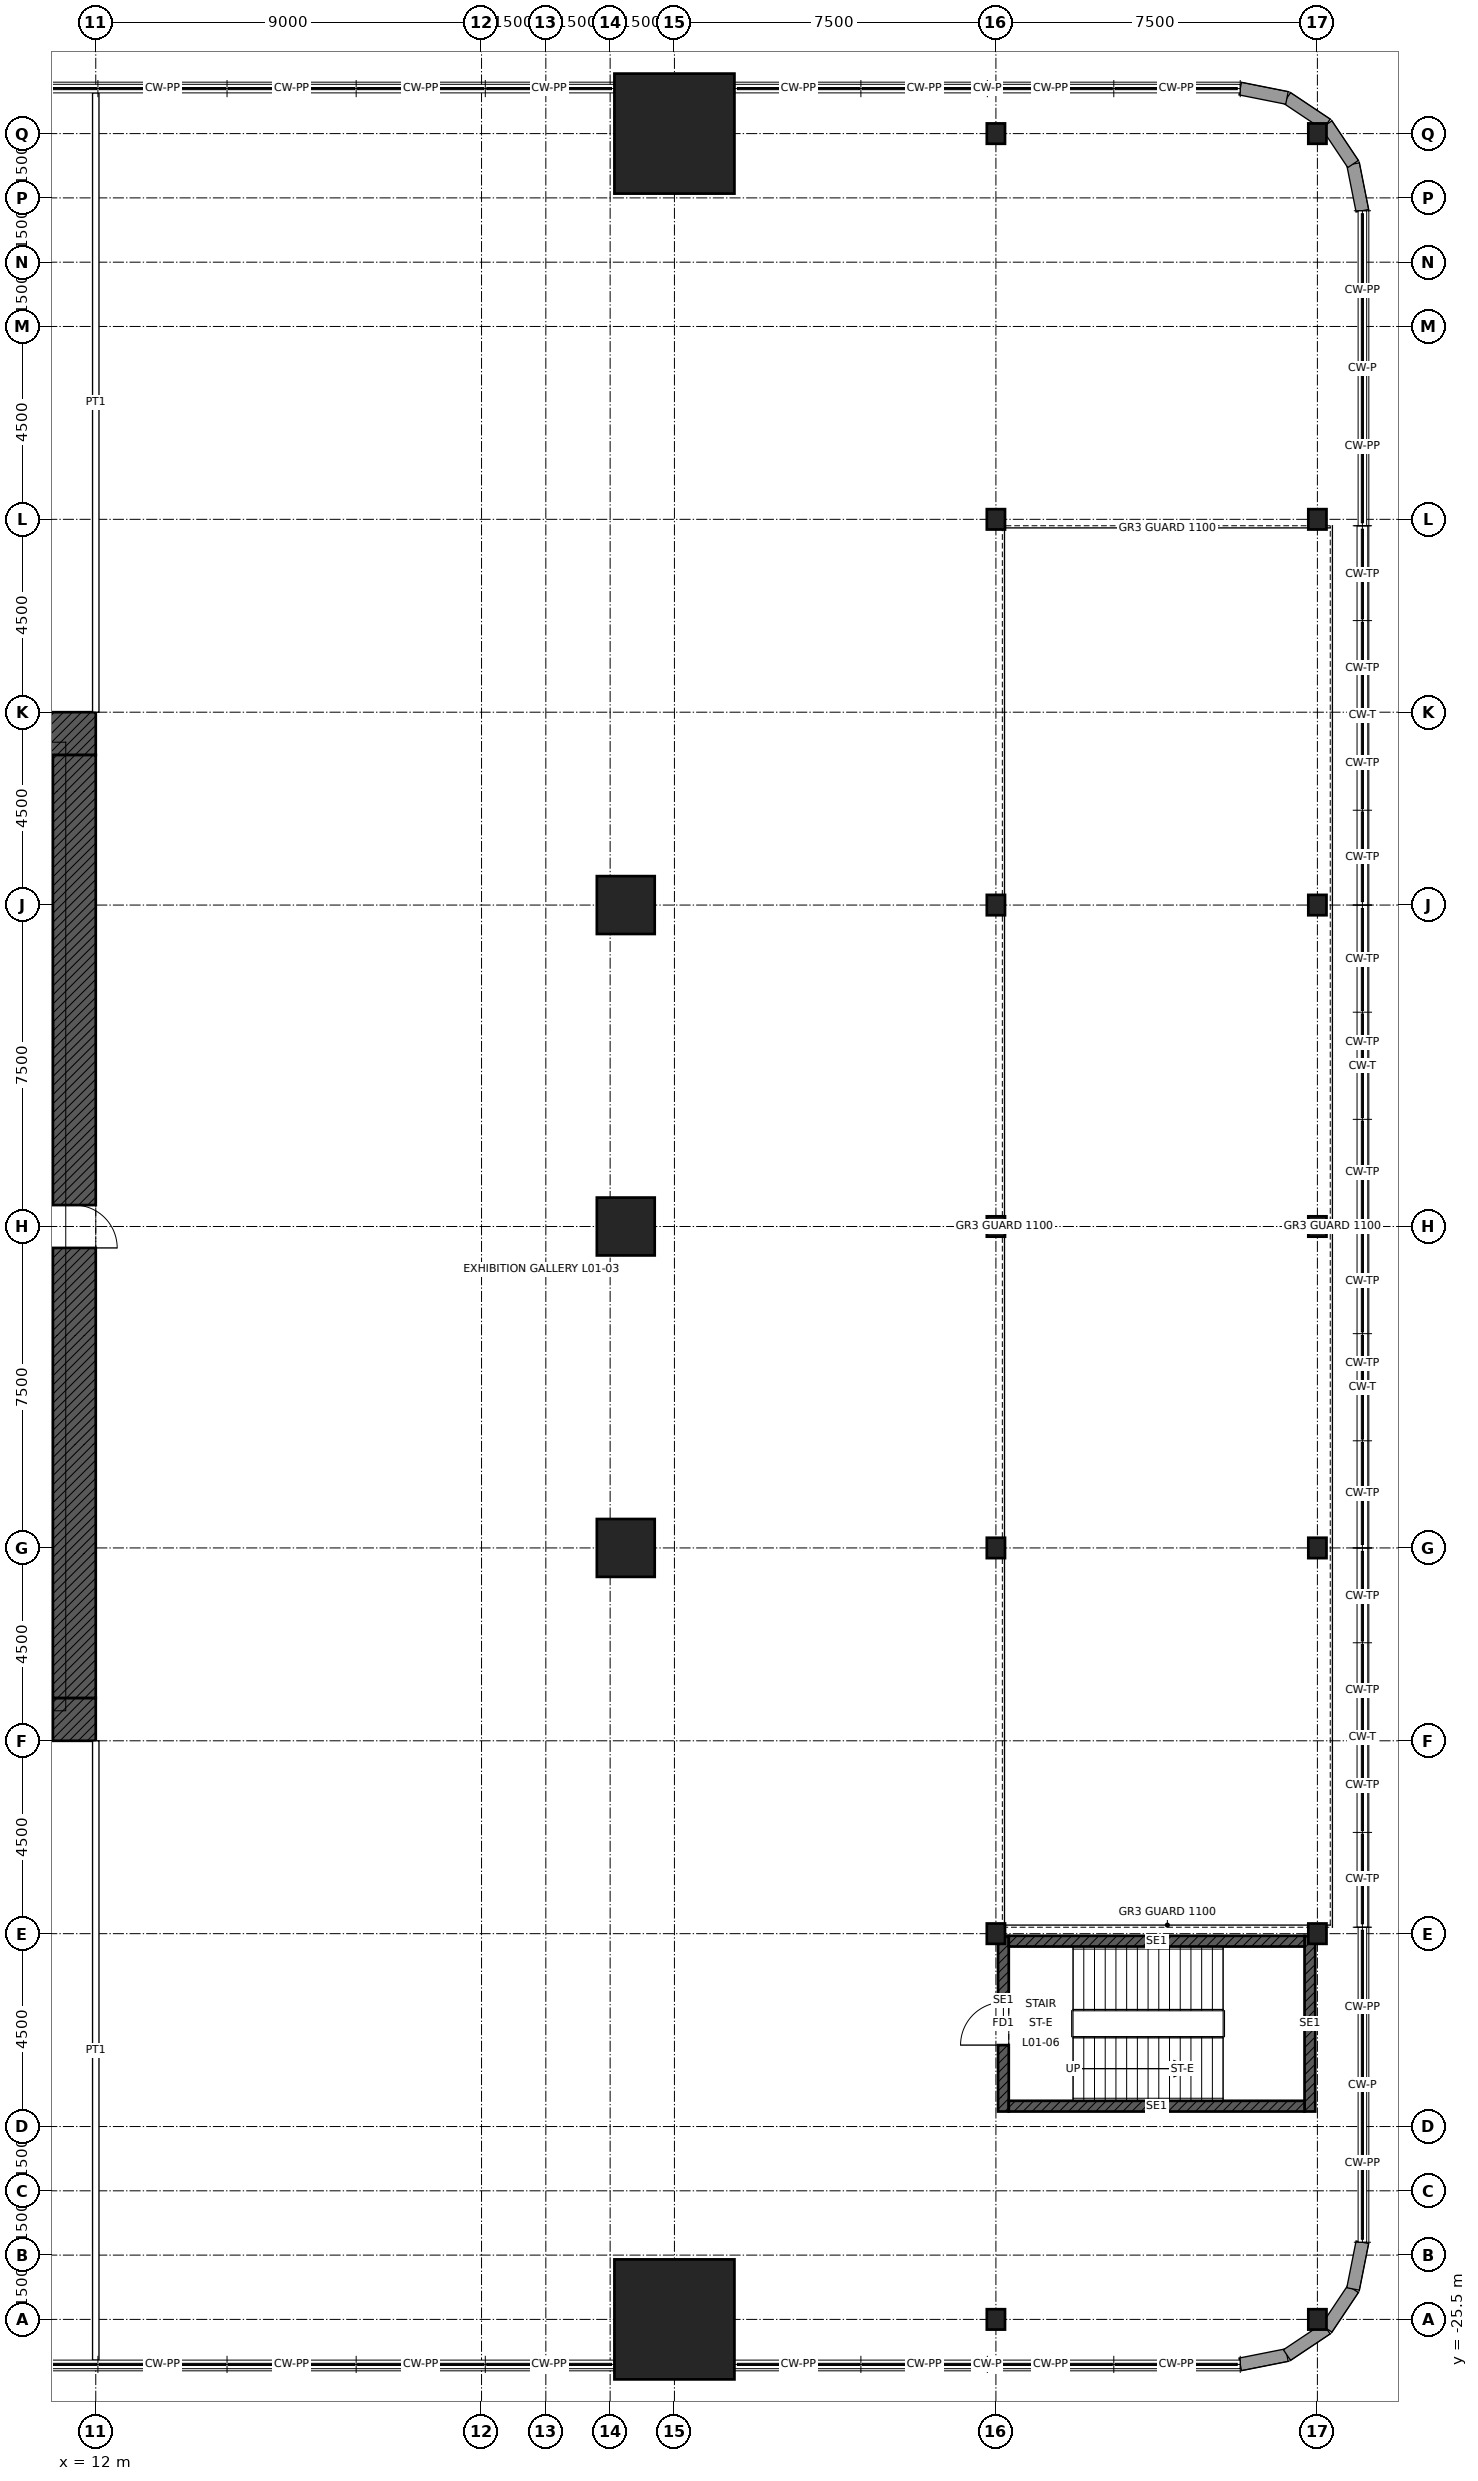
"""IFC4 building model, lengths in metres.
Left out: names, types, materials, properties, quantities, classifications, styles, units other than length and angle.
Written with IfcOpenShell. Run it as: python <this file> out.ifc"""

import sys

from ifc_helpers import new_model, si_unit, direction, frame, frame_2d, origin, origin_2d, place, context, subcontext, project, spatial, rectangle, hollow_rectangle, i_section, extrude, element, fill, save


model = new_model("IFC4")
c1 = context("Model", 3, precision=1e-05, world=origin(), true_north=direction((0.0, 1.0)))
c2 = subcontext(c1, "Body", "Model", "MODEL_VIEW")
j1 = project(units=[si_unit("LENGTHUNIT", "METRE"), si_unit("PLANEANGLEUNIT", "RADIAN")], contexts=[c1])
p1 = place(None, origin())
s1 = spatial("IfcSite", under=j1, at=p1, CompositionType="ELEMENT")
p2 = place(p1, origin())
s2 = spatial("IfcBuilding", under=s1, at=p2, CompositionType="ELEMENT")
p3 = place(p2, frame((0.0, 0.0, 7.2)))
s3 = spatial("IfcBuildingStorey", under=s2, at=p3, CompositionType="ELEMENT", Elevation=7.2)
for number, where, z_axis, x_axis in (
    (1, (25.5, 25.5, 0.0), (0.0, 0.0, 1.0), (1.0, 0.0, 0.0)),
    (2, (25.5, -25.5, 0.0), (0.0, 0.0, 1.0), (1.0, 0.0, 0.0)),
):
    element("IfcColumn", number, at=place(p3, frame(where, z_axis=z_axis, x_axis=x_axis)), inside=s3, PredefinedType="COLUMN", context=c2, shape_type="SweptSolid", body=[
        extrude(hollow_rectangle(XDim=2.8, YDim=2.8, WallThickness=0.14, at=origin_2d()), origin(), (0.0, 0.0, 1.0), 5.4),
    ])
for number, where, z_axis, x_axis in (
    (3, (24.365, 7.5, 0.0), (0.0, 0.0, 1.0), (1.0, 0.0, 0.0)),
    (4, (24.365, 0.0, 0.0), (0.0, 0.0, 1.0), (1.0, 0.0, 0.0)),
    (5, (24.365, -7.5, 0.0), (0.0, 0.0, 1.0), (1.0, 0.0, 0.0)),
):
    element("IfcColumn", number, at=place(p3, frame(where, z_axis=z_axis, x_axis=x_axis)), inside=s3, PredefinedType="COLUMN", context=c2, shape_type="SweptSolid", body=[
        extrude(hollow_rectangle(XDim=1.35, YDim=1.35, WallThickness=0.1, at=origin_2d()), origin(), (0.0, 0.0, 1.0), 5.4),
    ])
for number, where, z_axis, x_axis in (
    (6, (33.0, -25.5, 0.0), (0.0, 0.0, 1.0), (1.0, 0.0, 0.0)),
    (7, (33.0, -16.5, 0.0), (0.0, 0.0, 1.0), (1.0, 0.0, 0.0)),
    (8, (33.0, -7.5, 0.0), (0.0, 0.0, 1.0), (1.0, 0.0, 0.0)),
    (9, (33.0, 0.0, 0.0), (0.0, 0.0, 1.0), (1.0, 0.0, 0.0)),
    (10, (33.0, 7.5, 0.0), (0.0, 0.0, 1.0), (1.0, 0.0, 0.0)),
    (11, (33.0, 16.5, 0.0), (0.0, 0.0, 1.0), (1.0, 0.0, 0.0)),
    (12, (33.0, 25.5, 0.0), (0.0, 0.0, 1.0), (1.0, 0.0, 0.0)),
    (13, (40.5, -25.5, 0.0), (0.0, 0.0, 1.0), (1.0, 0.0, 0.0)),
    (14, (40.5, -16.5, 0.0), (0.0, 0.0, 1.0), (1.0, 0.0, 0.0)),
    (15, (40.5, -7.5, 0.0), (0.0, 0.0, 1.0), (1.0, 0.0, 0.0)),
    (16, (40.5, 0.0, 0.0), (0.0, 0.0, 1.0), (1.0, 0.0, 0.0)),
    (17, (40.5, 7.5, 0.0), (0.0, 0.0, 1.0), (1.0, 0.0, 0.0)),
    (18, (40.5, 16.5, 0.0), (0.0, 0.0, 1.0), (1.0, 0.0, 0.0)),
    (19, (40.5, 25.5, 0.0), (0.0, 0.0, 1.0), (1.0, 0.0, 0.0)),
):
    element("IfcColumn", number, at=place(p3, frame(where, z_axis=z_axis, x_axis=x_axis)), inside=s3, PredefinedType="COLUMN", context=c2, shape_type="SweptSolid", body=[
        extrude(i_section(OverallWidth=0.424, OverallDepth=0.475, WebThickness=0.048, FlangeThickness=0.077, at=origin_2d()), origin(), (0.0, 0.0, 1.0), 5.4),
    ])
p4 = place(p3, frame((-12.0, 11.5, 0.0), z_axis=(0.0, 0.0, 1.0), x_axis=(1.0, 0.0, 0.0)))
e20 = element("IfcWall", 20, at=p4, inside=s3, PredefinedType="SHEAR", context=c2, shape_type="SweptSolid", body=[
    extrude(rectangle(XDim=24.0, YDim=1.0, at=frame_2d((12.0, 0.0))), origin(), (0.0, 0.0, 1.0), 5.4),
])
p5 = place(p4, frame((6.25, 0.0, 0.0)))
e21 = element("IfcOpeningElement", 21, at=p5, cuts=e20, PredefinedType="OPENING", context=c2, shape_type="SweptSolid", body=[
    extrude(rectangle(XDim=1.0, YDim=2.4, at=frame_2d((0.5, 1.2))), frame((0.0, 0.51, 0.0), z_axis=(0.0, -1.0, 0.0), x_axis=(1.0, 0.0, 0.0)), (0.0, 0.0, 1.0), 1.02),
])
p6 = place(p4, frame((16.75, 0.0, 0.0)))
e22 = element("IfcOpeningElement", 22, at=p6, cuts=e20, PredefinedType="OPENING", context=c2, shape_type="SweptSolid", body=[
    extrude(rectangle(XDim=1.0, YDim=2.4, at=frame_2d((0.5, 1.2))), frame((0.0, 0.51, 0.0), z_axis=(0.0, -1.0, 0.0), x_axis=(1.0, 0.0, 0.0)), (0.0, 0.0, 1.0), 1.02),
])
p7 = place(p3, frame((12.0, -11.5, 0.0), z_axis=(0.0, 0.0, 1.0), x_axis=(-1.0, 0.0, 0.0)))
e23 = element("IfcWall", 23, at=p7, inside=s3, PredefinedType="SHEAR", context=c2, shape_type="SweptSolid", body=[
    extrude(rectangle(XDim=24.0, YDim=1.0, at=frame_2d((12.0, 0.0))), origin(), (0.0, 0.0, 1.0), 5.4),
])
p8 = place(p7, frame((11.5, 0.0, 0.0)))
e24 = element("IfcOpeningElement", 24, at=p8, cuts=e23, PredefinedType="OPENING", context=c2, shape_type="SweptSolid", body=[
    extrude(rectangle(XDim=1.0, YDim=2.1, at=frame_2d((0.5, 1.05))), frame((0.0, 0.51, 0.0), z_axis=(0.0, -1.0, 0.0), x_axis=(1.0, 0.0, 0.0)), (0.0, 0.0, 1.0), 1.02),
])
p9 = place(p7, frame((1.0, 0.0, 0.0)))
e25 = element("IfcOpeningElement", 25, at=p9, cuts=e23, PredefinedType="OPENING", context=c2, shape_type="SweptSolid", body=[
    extrude(rectangle(XDim=1.0, YDim=2.4, at=frame_2d((0.5, 1.2))), frame((0.0, 0.51, 0.0), z_axis=(0.0, -1.0, 0.0), x_axis=(1.0, 0.0, 0.0)), (0.0, 0.0, 1.0), 1.02),
])
p10 = place(p3, frame((11.5, 11.0, 0.0), z_axis=(0.0, 0.0, 1.0), x_axis=(0.0, -1.0, 0.0)))
e26 = element("IfcWall", 26, at=p10, inside=s3, PredefinedType="SHEAR", context=c2, shape_type="SweptSolid", body=[
    extrude(rectangle(XDim=22.0, YDim=1.0, at=frame_2d((11.0, 0.0))), origin(), (0.0, 0.0, 1.0), 5.4),
])
p11 = place(p10, frame((10.5, 0.0, 0.0)))
e27 = element("IfcOpeningElement", 27, at=p11, cuts=e26, PredefinedType="OPENING", context=c2, shape_type="SweptSolid", body=[
    extrude(rectangle(XDim=1.0, YDim=2.4, at=frame_2d((0.5, 1.2))), frame((0.0, 0.51, 0.0), z_axis=(0.0, -1.0, 0.0), x_axis=(1.0, 0.0, 0.0)), (0.0, 0.0, 1.0), 1.02),
])
for number, where, z_axis, x_axis in (
    (28, (41.55, 23.7, 0.0), (0.0, 0.0, 1.0), (-0.195, 0.981, 0.0)),
    (29, (41.333, 24.791, 0.0), (0.0, 0.0, 1.0), (-0.555, 0.832, 0.0)),
    (30, (40.715, 25.715, 0.0), (0.0, 0.0, 1.0), (-0.832, 0.555, 0.0)),
    (31, (39.791, 26.333, 0.0), (0.0, 0.0, 1.0), (-0.981, 0.195, 0.0)),
    (32, (38.7, -26.55, 0.0), (0.0, 0.0, 1.0), (0.981, 0.195, 0.0)),
    (33, (39.791, -26.333, 0.0), (0.0, 0.0, 1.0), (0.832, 0.555, 0.0)),
    (34, (40.715, -25.715, 0.0), (0.0, 0.0, 1.0), (0.555, 0.832, 0.0)),
    (35, (41.333, -24.791, 0.0), (0.0, 0.0, 1.0), (0.195, 0.981, 0.0)),
):
    element("IfcWall", number, at=place(p3, frame(where, z_axis=z_axis, x_axis=x_axis)), inside=s3, PredefinedType="SOLIDWALL", context=c2, shape_type="SweptSolid", body=[
        extrude(rectangle(XDim=1.112, YDim=0.3, at=frame_2d((0.556, 0.0))), origin(), (0.0, 0.0, 1.0), 5.15),
    ])
p12 = place(p3, frame((12.0, 12.0, 0.0), z_axis=(0.0, 0.0, 1.0), x_axis=(0.0, 1.0, 0.0)))
e36 = element("IfcWall", 36, at=p12, inside=s3, PredefinedType="PARTITIONING", context=c2, shape_type="SweptSolid", body=[
    extrude(rectangle(XDim=14.45, YDim=0.15, at=frame_2d((7.225, 0.0))), origin(), (0.0, 0.0, 1.0), 5.15),
])
p13 = place(p3, frame((12.0, -12.0, 0.0), z_axis=(0.0, 0.0, 1.0), x_axis=(0.0, -1.0, 0.0)))
e37 = element("IfcWall", 37, at=p13, inside=s3, PredefinedType="PARTITIONING", context=c2, shape_type="SweptSolid", body=[
    extrude(rectangle(XDim=14.45, YDim=0.15, at=frame_2d((7.225, 0.0))), origin(), (0.0, 0.0, 1.0), 4.109),
])
p14 = place(p3, frame((33.175, -20.65, 0.0), z_axis=(0.0, 0.0, 1.0), x_axis=(0.0, 1.0, 0.0)))
e38 = element("IfcWall", 38, at=p14, inside=s3, PredefinedType="SOLIDWALL", context=c2, shape_type="SweptSolid", body=[
    extrude(rectangle(XDim=4.1, YDim=0.25, at=frame_2d((2.05, 0.0))), origin(), (0.0, 0.0, 1.0), 5.15),
])
p15 = place(p14, frame((1.55, 0.0, 0.0)))
e39 = element("IfcOpeningElement", 39, at=p15, cuts=e38, PredefinedType="OPENING", context=c2, shape_type="SweptSolid", body=[
    extrude(rectangle(XDim=1.0, YDim=2.1, at=frame_2d((0.5, 1.05))), frame((0.0, 0.135, 0.0), z_axis=(0.0, -1.0, 0.0), x_axis=(1.0, 0.0, 0.0)), (0.0, 0.0, 1.0), 0.27),
])
p16 = place(p3, frame((40.325, -20.65, 0.0), z_axis=(0.0, 0.0, 1.0), x_axis=(0.0, 1.0, 0.0)))
e40 = element("IfcWall", 40, at=p16, inside=s3, PredefinedType="SOLIDWALL", context=c2, shape_type="SweptSolid", body=[
    extrude(rectangle(XDim=4.1, YDim=0.25, at=frame_2d((2.05, 0.0))), origin(), (0.0, 0.0, 1.0), 5.15),
])
for number, where, z_axis, x_axis in (
    (41, (33.3, -20.525, 0.0), (0.0, 0.0, 1.0), (1.0, 0.0, 0.0)),
    (42, (33.3, -16.675, 0.0), (0.0, 0.0, 1.0), (1.0, 0.0, 0.0)),
):
    element("IfcWall", number, at=place(p3, frame(where, z_axis=z_axis, x_axis=x_axis)), inside=s3, PredefinedType="SOLIDWALL", context=c2, shape_type="SweptSolid", body=[
        extrude(rectangle(XDim=6.9, YDim=0.25, at=frame_2d((3.45, 0.0))), origin(), (0.0, 0.0, 1.0), 5.15),
    ])
p17 = place(p11, origin())
e43 = element("IfcDoor", 43, at=p17, inside=s3, OperationType="SINGLE_SWING_RIGHT", PredefinedType="DOOR", context=c2, shape_type="SweptSolid", body=[
    extrude(rectangle(XDim=1.0, YDim=2.4, at=frame_2d((0.5, 1.2))), frame((0.0, 0.485, 0.0), z_axis=(0.0, -1.0, 0.0), x_axis=(1.0, 0.0, 0.0)), (0.0, 0.0, 1.0), 0.05),
])
fill(e27, e43)
p18 = place(p15, origin())
e44 = element("IfcDoor", 44, at=p18, inside=s3, OperationType="SINGLE_SWING_LEFT", PredefinedType="DOOR", context=c2, shape_type="SweptSolid", body=[
    extrude(rectangle(XDim=1.0, YDim=2.1, at=frame_2d((0.5, 1.05))), frame((0.0, 0.025, 0.0), z_axis=(0.0, -1.0, 0.0), x_axis=(1.0, 0.0, 0.0)), (0.0, 0.0, 1.0), 0.05),
])
fill(e39, e44)
save(model, sys.argv[1])
